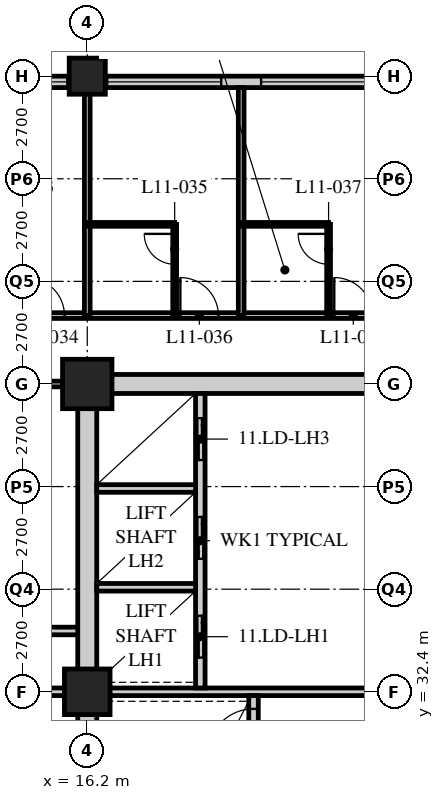
"""IFC4 building model, lengths in metres.
Left out: names, types, materials, properties, quantities, classifications, styles, units other than length and angle.
Written with IfcOpenShell. Run it as: python <this file> out.ifc"""

import sys

from ifc_helpers import new_model, si_unit, direction, frame, frame_2d, origin, origin_2d, place, context, subcontext, project, spatial, rectangle, hollow_rectangle, extrude, element, fill, save


model = new_model("IFC4")
c1 = context("Model", 3, precision=1e-05, world=origin(), true_north=direction((0.0, 1.0)))
c2 = subcontext(c1, "Body", "Model", "MODEL_VIEW")
j1 = project(units=[si_unit("LENGTHUNIT", "METRE"), si_unit("PLANEANGLEUNIT", "RADIAN")], contexts=[c1])
p1 = place(None, origin())
s1 = spatial("IfcSite", under=j1, at=p1, CompositionType="ELEMENT")
p2 = place(p1, origin())
s2 = spatial("IfcBuilding", under=s1, at=p2, CompositionType="ELEMENT")
p3 = place(p2, frame((0.0, 0.0, 50.0)))
s3 = spatial("IfcBuildingStorey", under=s2, at=p3, CompositionType="ELEMENT", Elevation=50.0)
p4 = place(p3, frame((16.2, 32.4, 0.0), z_axis=(0.0, 0.0, 1.0), x_axis=(1.0, 0.0, 0.0)))
e1 = element("IfcColumn", 1, at=p4, inside=s3, PredefinedType="COLUMN", context=c2, shape_type="SweptSolid", body=[
    extrude(hollow_rectangle(XDim=1.2, YDim=1.2, WallThickness=0.12, at=origin_2d()), origin(), (0.0, 0.0, 1.0), 3.4),
])
p5 = place(p3, frame((16.2, 40.5, 0.0), z_axis=(0.0, 0.0, 1.0), x_axis=(1.0, 0.0, 0.0)))
e2 = element("IfcColumn", 2, at=p5, inside=s3, PredefinedType="COLUMN", context=c2, shape_type="SweptSolid", body=[
    extrude(hollow_rectangle(XDim=1.3, YDim=1.3, WallThickness=0.13, at=origin_2d()), origin(), (0.0, 0.0, 1.0), 3.4),
])
p6 = place(p3, frame((16.2, 48.6, 0.0), z_axis=(0.0, 0.0, 1.0), x_axis=(1.0, 0.0, 0.0)))
e3 = element("IfcColumn", 3, at=p6, inside=s3, PredefinedType="COLUMN", context=c2, shape_type="SweptSolid", body=[
    extrude(hollow_rectangle(XDim=0.95, YDim=0.95, WallThickness=0.095, at=origin_2d()), origin(), (0.0, 0.0, 1.0), 3.4),
])
p7 = place(p3, frame((48.3, 48.45, 0.0), z_axis=(0.0, 0.0, 1.0), x_axis=(-1.0, 0.0, 0.0)))
e4 = element("IfcWall", 4, at=p7, inside=s3, PredefinedType="SOLIDWALL", context=c2, shape_type="SweptSolid", body=[
    extrude(rectangle(XDim=40.2, YDim=0.3, at=frame_2d((20.1, 0.0))), origin(), (0.0, 0.0, 1.0), 3.19),
])
p8 = place(p7, frame((0.225, 0.0, 0.9)))
e5 = element("IfcOpeningElement", 5, at=p8, cuts=e4, PredefinedType="OPENING", context=c2, shape_type="SweptSolid", body=[
    extrude(rectangle(XDim=3.0, YDim=2.0, at=frame_2d((1.5, 1.0))), frame((0.0, 0.16, 0.0), z_axis=(0.0, -1.0, 0.0), x_axis=(1.0, 0.0, 0.0)), (0.0, 0.0, 1.0), 0.32),
])
p9 = place(p7, frame((4.275, 0.0, 0.9)))
e6 = element("IfcOpeningElement", 6, at=p9, cuts=e4, PredefinedType="OPENING", context=c2, shape_type="SweptSolid", body=[
    extrude(rectangle(XDim=3.0, YDim=2.0, at=frame_2d((1.5, 1.0))), frame((0.0, 0.16, 0.0), z_axis=(0.0, -1.0, 0.0), x_axis=(1.0, 0.0, 0.0)), (0.0, 0.0, 1.0), 0.32),
])
p10 = place(p7, frame((8.325, 0.0, 0.9)))
e7 = element("IfcOpeningElement", 7, at=p10, cuts=e4, PredefinedType="OPENING", context=c2, shape_type="SweptSolid", body=[
    extrude(rectangle(XDim=3.0, YDim=2.0, at=frame_2d((1.5, 1.0))), frame((0.0, 0.16, 0.0), z_axis=(0.0, -1.0, 0.0), x_axis=(1.0, 0.0, 0.0)), (0.0, 0.0, 1.0), 0.32),
])
p11 = place(p7, frame((12.375, 0.0, 0.9)))
e8 = element("IfcOpeningElement", 8, at=p11, cuts=e4, PredefinedType="OPENING", context=c2, shape_type="SweptSolid", body=[
    extrude(rectangle(XDim=3.0, YDim=2.0, at=frame_2d((1.5, 1.0))), frame((0.0, 0.16, 0.0), z_axis=(0.0, -1.0, 0.0), x_axis=(1.0, 0.0, 0.0)), (0.0, 0.0, 1.0), 0.32),
])
p12 = place(p7, frame((16.425, 0.0, 0.9)))
e9 = element("IfcOpeningElement", 9, at=p12, cuts=e4, PredefinedType="OPENING", context=c2, shape_type="SweptSolid", body=[
    extrude(rectangle(XDim=3.0, YDim=2.0, at=frame_2d((1.5, 1.0))), frame((0.0, 0.16, 0.0), z_axis=(0.0, -1.0, 0.0), x_axis=(1.0, 0.0, 0.0)), (0.0, 0.0, 1.0), 0.32),
])
p13 = place(p7, frame((20.475, 0.0, 0.9)))
e10 = element("IfcOpeningElement", 10, at=p13, cuts=e4, PredefinedType="OPENING", context=c2, shape_type="SweptSolid", body=[
    extrude(rectangle(XDim=3.0, YDim=2.0, at=frame_2d((1.5, 1.0))), frame((0.0, 0.16, 0.0), z_axis=(0.0, -1.0, 0.0), x_axis=(1.0, 0.0, 0.0)), (0.0, 0.0, 1.0), 0.32),
])
p14 = place(p7, frame((24.525, 0.0, 0.9)))
e11 = element("IfcOpeningElement", 11, at=p14, cuts=e4, PredefinedType="OPENING", context=c2, shape_type="SweptSolid", body=[
    extrude(rectangle(XDim=3.0, YDim=2.0, at=frame_2d((1.5, 1.0))), frame((0.0, 0.16, 0.0), z_axis=(0.0, -1.0, 0.0), x_axis=(1.0, 0.0, 0.0)), (0.0, 0.0, 1.0), 0.32),
])
p15 = place(p7, frame((28.575, 0.0, 0.9)))
e12 = element("IfcOpeningElement", 12, at=p15, cuts=e4, PredefinedType="OPENING", context=c2, shape_type="SweptSolid", body=[
    extrude(rectangle(XDim=3.0, YDim=2.0, at=frame_2d((1.5, 1.0))), frame((0.0, 0.16, 0.0), z_axis=(0.0, -1.0, 0.0), x_axis=(1.0, 0.0, 0.0)), (0.0, 0.0, 1.0), 0.32),
])
p16 = place(p7, frame((32.625, 0.0, 0.9)))
e13 = element("IfcOpeningElement", 13, at=p16, cuts=e4, PredefinedType="OPENING", context=c2, shape_type="SweptSolid", body=[
    extrude(rectangle(XDim=3.0, YDim=2.0, at=frame_2d((1.5, 1.0))), frame((0.0, 0.16, 0.0), z_axis=(0.0, -1.0, 0.0), x_axis=(1.0, 0.0, 0.0)), (0.0, 0.0, 1.0), 0.32),
])
p17 = place(p7, frame((36.675, 0.0, 0.9)))
e14 = element("IfcOpeningElement", 14, at=p17, cuts=e4, PredefinedType="OPENING", context=c2, shape_type="SweptSolid", body=[
    extrude(rectangle(XDim=3.0, YDim=2.0, at=frame_2d((1.5, 1.0))), frame((0.0, 0.16, 0.0), z_axis=(0.0, -1.0, 0.0), x_axis=(1.0, 0.0, 0.0)), (0.0, 0.0, 1.0), 0.32),
])
p18 = place(p3, frame((8.1, 42.3, 0.0), z_axis=(0.0, 0.0, 1.0), x_axis=(1.0, 0.0, 0.0)))
e15 = element("IfcWall", 15, at=p18, inside=s3, PredefinedType="PARTITIONING", context=c2, shape_type="SweptSolid", body=[
    extrude(rectangle(XDim=40.5, YDim=0.15, at=frame_2d((20.25, 0.0))), origin(), (0.0, 0.0, 1.0), 3.19),
])
p19 = place(p18, frame((6.5, 0.0, 0.0)))
e16 = element("IfcOpeningElement", 16, at=p19, cuts=e15, PredefinedType="OPENING", context=c2, shape_type="SweptSolid", body=[
    extrude(rectangle(XDim=1.0, YDim=2.1, at=frame_2d((0.5, 1.05))), frame((0.0, 0.085, 0.0), z_axis=(0.0, -1.0, 0.0), x_axis=(1.0, 0.0, 0.0)), (0.0, 0.0, 1.0), 0.17),
])
p20 = place(p18, frame((10.55, 0.0, 0.0)))
e17 = element("IfcOpeningElement", 17, at=p20, cuts=e15, PredefinedType="OPENING", context=c2, shape_type="SweptSolid", body=[
    extrude(rectangle(XDim=1.0, YDim=2.1, at=frame_2d((0.5, 1.05))), frame((0.0, 0.085, 0.0), z_axis=(0.0, -1.0, 0.0), x_axis=(1.0, 0.0, 0.0)), (0.0, 0.0, 1.0), 0.17),
])
p21 = place(p18, frame((14.6, 0.0, 0.0)))
e18 = element("IfcOpeningElement", 18, at=p21, cuts=e15, PredefinedType="OPENING", context=c2, shape_type="SweptSolid", body=[
    extrude(rectangle(XDim=1.0, YDim=2.1, at=frame_2d((0.5, 1.05))), frame((0.0, 0.085, 0.0), z_axis=(0.0, -1.0, 0.0), x_axis=(1.0, 0.0, 0.0)), (0.0, 0.0, 1.0), 0.17),
])
p22 = place(p18, frame((18.65, 0.0, 0.0)))
e19 = element("IfcOpeningElement", 19, at=p22, cuts=e15, PredefinedType="OPENING", context=c2, shape_type="SweptSolid", body=[
    extrude(rectangle(XDim=1.0, YDim=2.1, at=frame_2d((0.5, 1.05))), frame((0.0, 0.085, 0.0), z_axis=(0.0, -1.0, 0.0), x_axis=(1.0, 0.0, 0.0)), (0.0, 0.0, 1.0), 0.17),
])
p23 = place(p18, frame((22.7, 0.0, 0.0)))
e20 = element("IfcOpeningElement", 20, at=p23, cuts=e15, PredefinedType="OPENING", context=c2, shape_type="SweptSolid", body=[
    extrude(rectangle(XDim=1.0, YDim=2.1, at=frame_2d((0.5, 1.05))), frame((0.0, 0.085, 0.0), z_axis=(0.0, -1.0, 0.0), x_axis=(1.0, 0.0, 0.0)), (0.0, 0.0, 1.0), 0.17),
])
p24 = place(p18, frame((26.75, 0.0, 0.0)))
e21 = element("IfcOpeningElement", 21, at=p24, cuts=e15, PredefinedType="OPENING", context=c2, shape_type="SweptSolid", body=[
    extrude(rectangle(XDim=1.0, YDim=2.1, at=frame_2d((0.5, 1.05))), frame((0.0, 0.085, 0.0), z_axis=(0.0, -1.0, 0.0), x_axis=(1.0, 0.0, 0.0)), (0.0, 0.0, 1.0), 0.17),
])
p25 = place(p18, frame((30.8, 0.0, 0.0)))
e22 = element("IfcOpeningElement", 22, at=p25, cuts=e15, PredefinedType="OPENING", context=c2, shape_type="SweptSolid", body=[
    extrude(rectangle(XDim=1.0, YDim=2.1, at=frame_2d((0.5, 1.05))), frame((0.0, 0.085, 0.0), z_axis=(0.0, -1.0, 0.0), x_axis=(1.0, 0.0, 0.0)), (0.0, 0.0, 1.0), 0.17),
])
p26 = place(p18, frame((34.85, 0.0, 0.0)))
e23 = element("IfcOpeningElement", 23, at=p26, cuts=e15, PredefinedType="OPENING", context=c2, shape_type="SweptSolid", body=[
    extrude(rectangle(XDim=1.0, YDim=2.1, at=frame_2d((0.5, 1.05))), frame((0.0, 0.085, 0.0), z_axis=(0.0, -1.0, 0.0), x_axis=(1.0, 0.0, 0.0)), (0.0, 0.0, 1.0), 0.17),
])
p27 = place(p18, frame((36.875, 0.0, 0.0)))
e24 = element("IfcOpeningElement", 24, at=p27, cuts=e15, PredefinedType="OPENING", context=c2, shape_type="SweptSolid", body=[
    extrude(rectangle(XDim=1.0, YDim=2.1, at=frame_2d((0.5, 1.05))), frame((0.0, 0.085, 0.0), z_axis=(0.0, -1.0, 0.0), x_axis=(1.0, 0.0, 0.0)), (0.0, 0.0, 1.0), 0.17),
])
p28 = place(p18, frame((2.625, 0.0, 0.0)))
e25 = element("IfcOpeningElement", 25, at=p28, cuts=e15, PredefinedType="OPENING", context=c2, shape_type="SweptSolid", body=[
    extrude(rectangle(XDim=1.0, YDim=2.1, at=frame_2d((0.5, 1.05))), frame((0.0, 0.085, 0.0), z_axis=(0.0, -1.0, 0.0), x_axis=(1.0, 0.0, 0.0)), (0.0, 0.0, 1.0), 0.17),
])
p29 = place(p3, frame((16.0, 40.5, 0.0), z_axis=(0.0, 0.0, 1.0), x_axis=(-1.0, 0.0, 0.0)))
e26 = element("IfcWall", 26, at=p29, inside=s3, PredefinedType="PARTITIONING", context=c2, shape_type="SweptSolid", body=[
    extrude(rectangle(XDim=6.1, YDim=0.15, at=frame_2d((3.05, 0.0))), origin(), (0.0, 0.0, 1.0), 2.578),
])
p30 = place(p3, frame((9.9, 32.4, 0.0), z_axis=(0.0, 0.0, 1.0), x_axis=(1.0, 0.0, 0.0)))
e27 = element("IfcWall", 27, at=p30, inside=s3, PredefinedType="SOLIDWALL", context=c2, shape_type="SweptSolid", body=[
    extrude(rectangle(XDim=6.3, YDim=0.2, at=frame_2d((3.15, 0.0))), origin(), (0.0, 0.0, 1.0), 2.578),
])
p31 = place(p3, frame((9.9, 34.0, 0.0), z_axis=(0.0, 0.0, 1.0), x_axis=(1.0, 0.0, 0.0)))
e28 = element("IfcWall", 28, at=p31, inside=s3, PredefinedType="SOLIDWALL", context=c2, shape_type="SweptSolid", body=[
    extrude(rectangle(XDim=6.3, YDim=0.2, at=frame_2d((3.15, 0.0))), origin(), (0.0, 0.0, 1.0), 3.19),
])
p32 = place(p3, frame((16.2, 42.3, 0.0), z_axis=(0.0, 0.0, 1.0), x_axis=(0.0, 1.0, 0.0)))
e29 = element("IfcWall", 29, at=p32, inside=s3, PredefinedType="PARTITIONING", context=c2, shape_type="SweptSolid", body=[
    extrude(rectangle(XDim=6.0, YDim=0.15, at=frame_2d((3.0, 0.0))), origin(), (0.0, 0.0, 1.0), 2.578),
])
p33 = place(p3, frame((16.2, 44.7, 0.0), z_axis=(0.0, 0.0, 1.0), x_axis=(1.0, 0.0, 0.0)))
e30 = element("IfcWall", 30, at=p33, inside=s3, PredefinedType="PARTITIONING", context=c2, shape_type="SweptSolid", body=[
    extrude(rectangle(XDim=2.3, YDim=0.1, at=frame_2d((1.15, 0.0))), origin(), (0.0, 0.0, 1.0), 3.19),
])
p34 = place(p3, frame((18.5, 42.3, 0.0), z_axis=(0.0, 0.0, 1.0), x_axis=(0.0, 1.0, 0.0)))
e31 = element("IfcWall", 31, at=p34, inside=s3, PredefinedType="PARTITIONING", context=c2, shape_type="SweptSolid", body=[
    extrude(rectangle(XDim=2.4, YDim=0.1, at=frame_2d((1.2, 0.0))), origin(), (0.0, 0.0, 1.0), 3.19),
])
p35 = place(p34, frame((1.35, 0.0, 0.0)))
e32 = element("IfcOpeningElement", 32, at=p35, cuts=e31, PredefinedType="OPENING", context=c2, shape_type="SweptSolid", body=[
    extrude(rectangle(XDim=0.8, YDim=2.1, at=frame_2d((0.4, 1.05))), frame((0.0, 0.06, 0.0), z_axis=(0.0, -1.0, 0.0), x_axis=(1.0, 0.0, 0.0)), (0.0, 0.0, 1.0), 0.12),
])
p36 = place(p3, frame((20.25, 42.3, 0.0), z_axis=(0.0, 0.0, 1.0), x_axis=(0.0, 1.0, 0.0)))
e33 = element("IfcWall", 33, at=p36, inside=s3, PredefinedType="PARTITIONING", context=c2, shape_type="SweptSolid", body=[
    extrude(rectangle(XDim=6.0, YDim=0.15, at=frame_2d((3.0, 0.0))), origin(), (0.0, 0.0, 1.0), 3.19),
])
p37 = place(p3, frame((20.25, 44.7, 0.0), z_axis=(0.0, 0.0, 1.0), x_axis=(1.0, 0.0, 0.0)))
e34 = element("IfcWall", 34, at=p37, inside=s3, PredefinedType="PARTITIONING", context=c2, shape_type="SweptSolid", body=[
    extrude(rectangle(XDim=2.3, YDim=0.1, at=frame_2d((1.15, 0.0))), origin(), (0.0, 0.0, 1.0), 3.19),
])
p38 = place(p3, frame((22.55, 42.3, 0.0), z_axis=(0.0, 0.0, 1.0), x_axis=(0.0, 1.0, 0.0)))
e35 = element("IfcWall", 35, at=p38, inside=s3, PredefinedType="PARTITIONING", context=c2, shape_type="SweptSolid", body=[
    extrude(rectangle(XDim=2.4, YDim=0.1, at=frame_2d((1.2, 0.0))), origin(), (0.0, 0.0, 1.0), 3.19),
])
p39 = place(p38, frame((1.35, 0.0, 0.0)))
e36 = element("IfcOpeningElement", 36, at=p39, cuts=e35, PredefinedType="OPENING", context=c2, shape_type="SweptSolid", body=[
    extrude(rectangle(XDim=0.8, YDim=2.1, at=frame_2d((0.4, 1.05))), frame((0.0, 0.06, 0.0), z_axis=(0.0, -1.0, 0.0), x_axis=(1.0, 0.0, 0.0)), (0.0, 0.0, 1.0), 0.12),
])
p40 = place(p3, frame((15.95, 40.5, 0.0), z_axis=(0.0, 0.0, 1.0), x_axis=(1.0, 0.0, 0.0)))
e37 = element("IfcWall", 37, at=p40, inside=s3, PredefinedType="SOLIDWALL", context=c2, shape_type="SweptSolid", body=[
    extrude(rectangle(XDim=24.8, YDim=0.5, at=frame_2d((12.4, 0.0))), origin(), (0.0, 0.0, 1.0), 2.54),
])
p41 = place(p40, frame((11.5, 0.0, 0.0)))
e38 = element("IfcOpeningElement", 38, at=p41, cuts=e37, PredefinedType="OPENING", context=c2, shape_type="SweptSolid", body=[
    extrude(rectangle(XDim=1.8, YDim=2.4, at=frame_2d((0.9, 1.2))), frame((0.0, 0.26, 0.0), z_axis=(0.0, -1.0, 0.0), x_axis=(1.0, 0.0, 0.0)), (0.0, 0.0, 1.0), 0.52),
])
p42 = place(p3, frame((16.2, 24.55, 0.0), z_axis=(0.0, 0.0, 1.0), x_axis=(0.0, 1.0, 0.0)))
e39 = element("IfcWall", 39, at=p42, inside=s3, PredefinedType="SOLIDWALL", context=c2, shape_type="SweptSolid", body=[
    extrude(rectangle(XDim=15.7, YDim=0.5, at=frame_2d((7.85, 0.0))), origin(), (0.0, 0.0, 1.0), 2.578),
])
p43 = place(p3, frame((16.45, 32.4, 0.0), z_axis=(0.0, 0.0, 1.0), x_axis=(1.0, 0.0, 0.0)))
e40 = element("IfcWall", 40, at=p43, inside=s3, PredefinedType="SOLIDWALL", context=c2, shape_type="SweptSolid", body=[
    extrude(rectangle(XDim=7.95, YDim=0.2, at=frame_2d((3.975, 0.0))), origin(), (0.0, 0.0, 1.0), 2.578),
])
p44 = place(p3, frame((20.575, 24.55, 0.0), z_axis=(0.0, 0.0, 1.0), x_axis=(0.0, 1.0, 0.0)))
e41 = element("IfcWall", 41, at=p44, inside=s3, PredefinedType="SOLIDWALL", context=c2, shape_type="SweptSolid", body=[
    extrude(rectangle(XDim=7.75, YDim=0.25, at=frame_2d((3.875, 0.0))), origin(), (0.0, 0.0, 1.0), 3.19),
])
p45 = place(p44, frame((6.2, 0.0, 0.0)))
e42 = element("IfcOpeningElement", 42, at=p45, cuts=e41, PredefinedType="OPENING", context=c2, shape_type="SweptSolid", body=[
    extrude(rectangle(XDim=1.2, YDim=2.1, at=frame_2d((0.6, 1.05))), frame((0.0, 0.135, 0.0), z_axis=(0.0, -1.0, 0.0), x_axis=(1.0, 0.0, 0.0)), (0.0, 0.0, 1.0), 0.27),
])
p46 = place(p3, frame((19.175, 32.5, 0.0), z_axis=(0.0, 0.0, 1.0), x_axis=(0.0, 1.0, 0.0)))
e43 = element("IfcWall", 43, at=p46, inside=s3, PredefinedType="SOLIDWALL", context=c2, shape_type="SweptSolid", body=[
    extrude(rectangle(XDim=7.75, YDim=0.25, at=frame_2d((3.875, 0.0))), origin(), (0.0, 0.0, 1.0), 3.19),
])
p47 = place(p46, frame((0.8, 0.0, 0.0)))
e44 = element("IfcOpeningElement", 44, at=p47, cuts=e43, PredefinedType="OPENING", context=c2, shape_type="SweptSolid", body=[
    extrude(rectangle(XDim=1.1, YDim=2.4, at=frame_2d((0.55, 1.2))), frame((0.0, 0.135, 0.0), z_axis=(0.0, -1.0, 0.0), x_axis=(1.0, 0.0, 0.0)), (0.0, 0.0, 1.0), 0.27),
])
p48 = place(p46, frame((3.4, 0.0, 0.0)))
e45 = element("IfcOpeningElement", 45, at=p48, cuts=e43, PredefinedType="OPENING", context=c2, shape_type="SweptSolid", body=[
    extrude(rectangle(XDim=1.1, YDim=2.4, at=frame_2d((0.55, 1.2))), frame((0.0, 0.135, 0.0), z_axis=(0.0, -1.0, 0.0), x_axis=(1.0, 0.0, 0.0)), (0.0, 0.0, 1.0), 0.27),
])
p49 = place(p46, frame((6.0, 0.0, 0.0)))
e46 = element("IfcOpeningElement", 46, at=p49, cuts=e43, PredefinedType="OPENING", context=c2, shape_type="SweptSolid", body=[
    extrude(rectangle(XDim=1.1, YDim=2.4, at=frame_2d((0.55, 1.2))), frame((0.0, 0.135, 0.0), z_axis=(0.0, -1.0, 0.0), x_axis=(1.0, 0.0, 0.0)), (0.0, 0.0, 1.0), 0.27),
])
for number, where, z_axis, x_axis in (
    (47, (16.45, 35.15, 0.0), (0.0, 0.0, 1.0), (1.0, 0.0, 0.0)),
    (48, (16.45, 37.75, 0.0), (0.0, 0.0, 1.0), (1.0, 0.0, 0.0)),
):
    element("IfcWall", number, at=place(p3, frame(where, z_axis=z_axis, x_axis=x_axis)), inside=s3, PredefinedType="SOLIDWALL", context=c2, shape_type="SweptSolid", body=[
        extrude(rectangle(XDim=2.6, YDim=0.2, at=frame_2d((1.3, 0.0))), origin(), (0.0, 0.0, 1.0), 3.19),
    ])
p50 = place(p14, origin())
e49 = element("IfcWindow", 49, at=p50, inside=s3, PartitioningType="SINGLE_PANEL", PredefinedType="WINDOW", context=c2, shape_type="SweptSolid", body=[
    extrude(rectangle(XDim=3.0, YDim=2.0, at=frame_2d((1.5, 1.0))), frame((0.0, 0.03, 0.0), z_axis=(0.0, -1.0, 0.0), x_axis=(1.0, 0.0, 0.0)), (0.0, 0.0, 1.0), 0.06),
])
fill(e11, e49)
p51 = place(p15, origin())
e50 = element("IfcWindow", 50, at=p51, inside=s3, PartitioningType="SINGLE_PANEL", PredefinedType="WINDOW", context=c2, shape_type="SweptSolid", body=[
    extrude(rectangle(XDim=3.0, YDim=2.0, at=frame_2d((1.5, 1.0))), frame((0.0, 0.03, 0.0), z_axis=(0.0, -1.0, 0.0), x_axis=(1.0, 0.0, 0.0)), (0.0, 0.0, 1.0), 0.06),
])
fill(e12, e50)
p52 = place(p16, origin())
e51 = element("IfcWindow", 51, at=p52, inside=s3, PartitioningType="SINGLE_PANEL", PredefinedType="WINDOW", context=c2, shape_type="SweptSolid", body=[
    extrude(rectangle(XDim=3.0, YDim=2.0, at=frame_2d((1.5, 1.0))), frame((0.0, 0.03, 0.0), z_axis=(0.0, -1.0, 0.0), x_axis=(1.0, 0.0, 0.0)), (0.0, 0.0, 1.0), 0.06),
])
fill(e13, e51)
p53 = place(p19, origin())
e52 = element("IfcDoor", 52, at=p53, inside=s3, OperationType="SINGLE_SWING_LEFT", PredefinedType="DOOR", context=c2, shape_type="SweptSolid", body=[
    extrude(rectangle(XDim=1.0, YDim=2.1, at=frame_2d((0.5, 1.05))), frame((0.0, 0.025, 0.0), z_axis=(0.0, -1.0, 0.0), x_axis=(1.0, 0.0, 0.0)), (0.0, 0.0, 1.0), 0.05),
])
fill(e16, e52)
p54 = place(p35, origin())
e53 = element("IfcDoor", 53, at=p54, inside=s3, OperationType="SINGLE_SWING_RIGHT", PredefinedType="DOOR", context=c2, shape_type="SweptSolid", body=[
    extrude(rectangle(XDim=0.8, YDim=2.1, at=frame_2d((0.4, 1.05))), frame((0.0, 0.025, 0.0), z_axis=(0.0, -1.0, 0.0), x_axis=(1.0, 0.0, 0.0)), (0.0, 0.0, 1.0), 0.05),
])
fill(e32, e53)
p55 = place(p20, origin())
e54 = element("IfcDoor", 54, at=p55, inside=s3, OperationType="SINGLE_SWING_LEFT", PredefinedType="DOOR", context=c2, shape_type="SweptSolid", body=[
    extrude(rectangle(XDim=1.0, YDim=2.1, at=frame_2d((0.5, 1.05))), frame((0.0, 0.025, 0.0), z_axis=(0.0, -1.0, 0.0), x_axis=(1.0, 0.0, 0.0)), (0.0, 0.0, 1.0), 0.05),
])
fill(e17, e54)
p56 = place(p39, origin())
e55 = element("IfcDoor", 55, at=p56, inside=s3, OperationType="SINGLE_SWING_RIGHT", PredefinedType="DOOR", context=c2, shape_type="SweptSolid", body=[
    extrude(rectangle(XDim=0.8, YDim=2.1, at=frame_2d((0.4, 1.05))), frame((0.0, 0.025, 0.0), z_axis=(0.0, -1.0, 0.0), x_axis=(1.0, 0.0, 0.0)), (0.0, 0.0, 1.0), 0.05),
])
fill(e36, e55)
p57 = place(p21, origin())
e56 = element("IfcDoor", 56, at=p57, inside=s3, OperationType="SINGLE_SWING_LEFT", PredefinedType="DOOR", context=c2, shape_type="SweptSolid", body=[
    extrude(rectangle(XDim=1.0, YDim=2.1, at=frame_2d((0.5, 1.05))), frame((0.0, 0.025, 0.0), z_axis=(0.0, -1.0, 0.0), x_axis=(1.0, 0.0, 0.0)), (0.0, 0.0, 1.0), 0.05),
])
fill(e18, e56)
p58 = place(p45, origin())
e57 = element("IfcDoor", 57, at=p58, inside=s3, OperationType="SINGLE_SWING_LEFT", PredefinedType="DOOR", context=c2, shape_type="SweptSolid", body=[
    extrude(rectangle(XDim=1.2, YDim=2.1, at=frame_2d((0.6, 1.05))), frame((0.0, 0.025, 0.0), z_axis=(0.0, -1.0, 0.0), x_axis=(1.0, 0.0, 0.0)), (0.0, 0.0, 1.0), 0.05),
])
fill(e42, e57)
p59 = place(p47, origin())
e58 = element("IfcDoor", 58, at=p59, inside=s3, OperationType="DOUBLE_DOOR_SLIDING", PredefinedType="DOOR", context=c2, shape_type="SweptSolid", body=[
    extrude(rectangle(XDim=1.1, YDim=2.4, at=frame_2d((0.55, 1.2))), frame((0.0, 0.025, 0.0), z_axis=(0.0, -1.0, 0.0), x_axis=(1.0, 0.0, 0.0)), (0.0, 0.0, 1.0), 0.05),
])
fill(e44, e58)
p60 = place(p48, origin())
e59 = element("IfcDoor", 59, at=p60, inside=s3, OperationType="DOUBLE_DOOR_SLIDING", PredefinedType="DOOR", context=c2, shape_type="SweptSolid", body=[
    extrude(rectangle(XDim=1.1, YDim=2.4, at=frame_2d((0.55, 1.2))), frame((0.0, 0.025, 0.0), z_axis=(0.0, -1.0, 0.0), x_axis=(1.0, 0.0, 0.0)), (0.0, 0.0, 1.0), 0.05),
])
fill(e45, e59)
p61 = place(p49, origin())
e60 = element("IfcDoor", 60, at=p61, inside=s3, OperationType="DOUBLE_DOOR_SLIDING", PredefinedType="DOOR", context=c2, shape_type="SweptSolid", body=[
    extrude(rectangle(XDim=1.1, YDim=2.4, at=frame_2d((0.55, 1.2))), frame((0.0, 0.025, 0.0), z_axis=(0.0, -1.0, 0.0), x_axis=(1.0, 0.0, 0.0)), (0.0, 0.0, 1.0), 0.05),
])
fill(e46, e60)
save(model, sys.argv[1])
